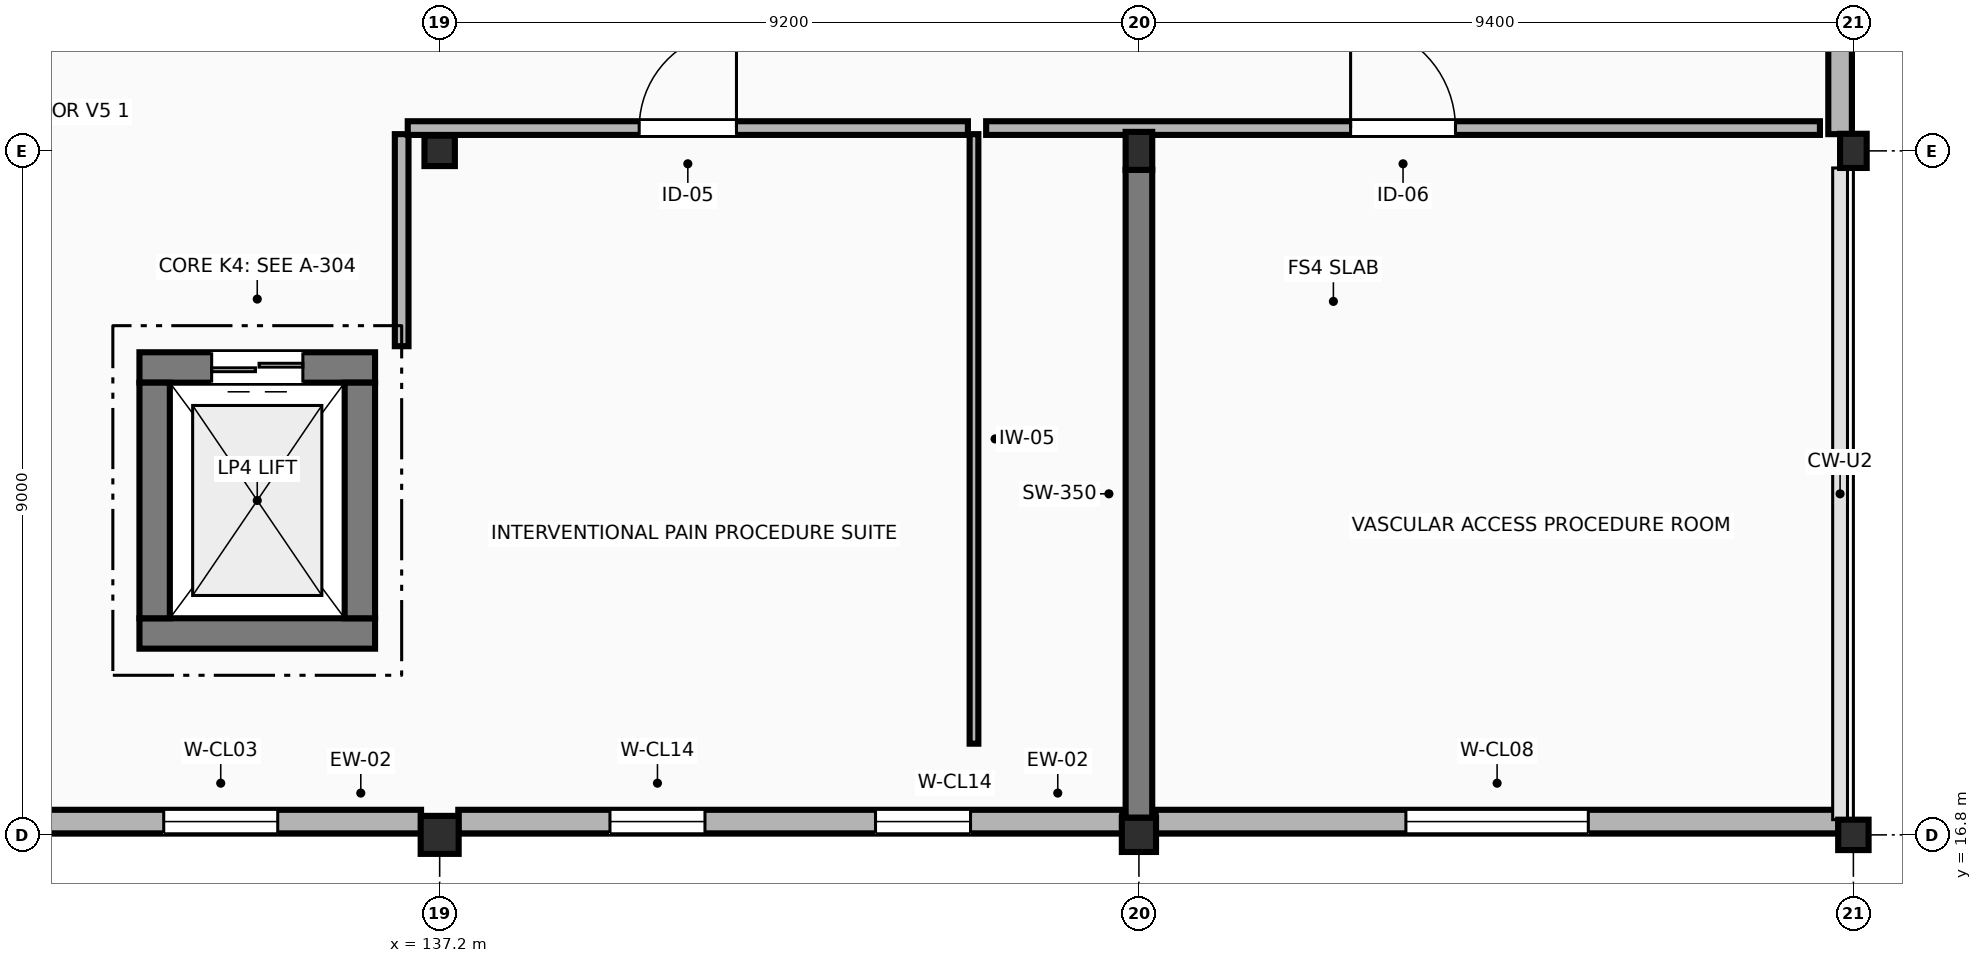
"""IFC4 building model, lengths in metres.
Left out: names, types, materials, properties, quantities, classifications, styles, units other than length and angle.
Written with IfcOpenShell. Run it as: python <this file> out.ifc"""

import sys

from ifc_helpers import new_model, si_unit, direction, frame, frame_2d, origin, origin_2d, place, context, subcontext, project, spatial, rectangle, extrude, element, fill, save


model = new_model("IFC4")
c1 = context("Model", 3, precision=1e-05, world=origin(), true_north=direction((0.0, 1.0)))
c2 = subcontext(c1, "Body", "Model", "MODEL_VIEW")
j1 = project(units=[si_unit("LENGTHUNIT", "METRE"), si_unit("PLANEANGLEUNIT", "RADIAN")], contexts=[c1])
p1 = place(None, origin())
s1 = spatial("IfcSite", under=j1, at=p1, CompositionType="ELEMENT")
p2 = place(p1, origin())
s2 = spatial("IfcBuilding", under=s1, at=p2, CompositionType="ELEMENT")
p3 = place(p2, frame((0.0, 0.0, 13.8)))
s3 = spatial("IfcBuildingStorey", under=s2, at=p3, CompositionType="ELEMENT", Elevation=13.8)
p4 = place(p3, frame((137.2, 16.8, 0.0), z_axis=(0.0, 0.0, 1.0), x_axis=(1.0, 0.0, 0.0)))
e1 = element("IfcColumn", 1, at=p4, inside=s3, PredefinedType="COLUMN", context=c2, shape_type="SweptSolid", body=[
    extrude(rectangle(XDim=0.5, YDim=0.5, at=origin_2d()), origin(), (0.0, 0.0, 1.0), 4.2),
])
p5 = place(p3, frame((137.2, 25.8, 0.0), z_axis=(0.0, 0.0, 1.0), x_axis=(1.0, 0.0, 0.0)))
e2 = element("IfcColumn", 2, at=p5, inside=s3, PredefinedType="COLUMN", context=c2, shape_type="SweptSolid", body=[
    extrude(rectangle(XDim=0.4, YDim=0.4, at=origin_2d()), origin(), (0.0, 0.0, 1.0), 4.2),
])
p6 = place(p3, frame((146.4, 16.8, 0.0), z_axis=(0.0, 0.0, 1.0), x_axis=(1.0, 0.0, 0.0)))
e3 = element("IfcColumn", 3, at=p6, inside=s3, PredefinedType="COLUMN", context=c2, shape_type="SweptSolid", body=[
    extrude(rectangle(XDim=0.45, YDim=0.45, at=origin_2d()), origin(), (0.0, 0.0, 1.0), 4.2),
])
p7 = place(p3, frame((146.4, 25.8, 0.0), z_axis=(0.0, 0.0, 1.0), x_axis=(1.0, 0.0, 0.0)))
e4 = element("IfcColumn", 4, at=p7, inside=s3, PredefinedType="COLUMN", context=c2, shape_type="SweptSolid", body=[
    extrude(rectangle(XDim=0.35, YDim=0.5, at=origin_2d()), origin(), (0.0, 0.0, 1.0), 4.2),
])
p8 = place(p3, frame((155.8, 16.8, 0.0), z_axis=(0.0, 0.0, 1.0), x_axis=(1.0, 0.0, 0.0)))
e5 = element("IfcColumn", 5, at=p8, inside=s3, PredefinedType="COLUMN", context=c2, shape_type="SweptSolid", body=[
    extrude(rectangle(XDim=0.4, YDim=0.4, at=origin_2d()), origin(), (0.0, 0.0, 1.0), 4.2),
])
p9 = place(p3, frame((155.8, 25.8, 0.0), z_axis=(0.0, 0.0, 1.0), x_axis=(1.0, 0.0, 0.0)))
e6 = element("IfcColumn", 6, at=p9, inside=s3, PredefinedType="COLUMN", context=c2, shape_type="SweptSolid", body=[
    extrude(rectangle(XDim=0.35, YDim=0.45, at=origin_2d()), origin(), (0.0, 0.0, 1.0), 4.2),
])
p10 = place(p3, frame((128.17, 16.975, 0.0), z_axis=(0.0, 0.0, 1.0), x_axis=(1.0, 0.0, 0.0)))
e7 = element("IfcWall", 7, at=p10, inside=s3, PredefinedType="STANDARD", context=c2, shape_type="SweptSolid", body=[
    extrude(rectangle(XDim=8.785, YDim=0.31, at=frame_2d((4.393, 0.0))), origin(), (0.0, 0.0, 1.0), 3.255),
])
p11 = place(p10, frame((1.885, 0.0, 0.95)))
e8 = element("IfcOpeningElement", 8, at=p11, cuts=e7, PredefinedType="OPENING", context=c2, shape_type="SweptSolid", body=[
    extrude(rectangle(XDim=1.5, YDim=1.65, at=frame_2d((0.75, 0.825))), frame((0.0, 0.165, 0.0), z_axis=(0.0, -1.0, 0.0), x_axis=(1.0, 0.0, 0.0)), (0.0, 0.0, 1.0), 0.33),
])
p12 = place(p10, frame((5.399, 0.0, 0.95)))
e9 = element("IfcOpeningElement", 9, at=p12, cuts=e7, PredefinedType="OPENING", context=c2, shape_type="SweptSolid", body=[
    extrude(rectangle(XDim=1.5, YDim=1.65, at=frame_2d((0.75, 0.825))), frame((0.0, 0.165, 0.0), z_axis=(0.0, -1.0, 0.0), x_axis=(1.0, 0.0, 0.0)), (0.0, 0.0, 1.0), 0.33),
])
p13 = place(p3, frame((137.445, 16.975, 0.0), z_axis=(0.0, 0.0, 1.0), x_axis=(1.0, 0.0, 0.0)))
e10 = element("IfcWall", 10, at=p13, inside=s3, PredefinedType="STANDARD", context=c2, shape_type="SweptSolid", body=[
    extrude(rectangle(XDim=8.735, YDim=0.31, at=frame_2d((4.367, 0.0))), origin(), (0.0, 0.0, 1.0), 3.255),
])
p14 = place(p13, frame((1.996, 0.0, 0.95)))
e11 = element("IfcOpeningElement", 11, at=p14, cuts=e10, PredefinedType="OPENING", context=c2, shape_type="SweptSolid", body=[
    extrude(rectangle(XDim=1.25, YDim=1.55, at=frame_2d((0.625, 0.775))), frame((0.0, 0.165, 0.0), z_axis=(0.0, -1.0, 0.0), x_axis=(1.0, 0.0, 0.0)), (0.0, 0.0, 1.0), 0.33),
])
p15 = place(p13, frame((5.49, 0.0, 0.95)))
e12 = element("IfcOpeningElement", 12, at=p15, cuts=e10, PredefinedType="OPENING", context=c2, shape_type="SweptSolid", body=[
    extrude(rectangle(XDim=1.25, YDim=1.55, at=frame_2d((0.625, 0.775))), frame((0.0, 0.165, 0.0), z_axis=(0.0, -1.0, 0.0), x_axis=(1.0, 0.0, 0.0)), (0.0, 0.0, 1.0), 0.33),
])
p16 = place(p3, frame((146.62, 16.975, 0.0), z_axis=(0.0, 0.0, 1.0), x_axis=(1.0, 0.0, 0.0)))
e13 = element("IfcWall", 13, at=p16, inside=s3, PredefinedType="STANDARD", context=c2, shape_type="SweptSolid", body=[
    extrude(rectangle(XDim=8.985, YDim=0.31, at=frame_2d((4.492, 0.0))), origin(), (0.0, 0.0, 1.0), 3.225),
])
p17 = place(p16, frame((3.292, 0.0, 0.95)))
e14 = element("IfcOpeningElement", 14, at=p17, cuts=e13, PredefinedType="OPENING", context=c2, shape_type="SweptSolid", body=[
    extrude(rectangle(XDim=2.4, YDim=1.5, at=frame_2d((1.2, 0.75))), frame((0.0, 0.165, 0.0), z_axis=(0.0, -1.0, 0.0), x_axis=(1.0, 0.0, 0.0)), (0.0, 0.0, 1.0), 0.33),
])
p18 = place(p3, frame((155.625, 26.02, 0.0), z_axis=(0.0, 0.0, 1.0), x_axis=(0.0, 1.0, 0.0)))
e15 = element("IfcWall", 15, at=p18, inside=s3, PredefinedType="STANDARD", context=c2, shape_type="SweptSolid", body=[
    extrude(rectangle(XDim=8.36, YDim=0.31, at=frame_2d((4.18, 0.0))), origin(), (0.0, 0.0, 1.0), 3.335),
])
p19 = place(p3, frame((133.25, 19.45, 0.0), z_axis=(0.0, 0.0, 1.0), x_axis=(1.0, 0.0, 0.0)))
e16 = element("IfcWall", 16, at=p19, inside=s3, PredefinedType="SHEAR", context=c2, shape_type="SweptSolid", body=[
    extrude(rectangle(XDim=3.1, YDim=0.4, at=frame_2d((1.55, 0.0))), origin(), (0.0, 0.0, 1.0), 4.2),
])
p20 = place(p3, frame((136.35, 22.95, 0.0), z_axis=(0.0, 0.0, 1.0), x_axis=(-1.0, 0.0, 0.0)))
e17 = element("IfcWall", 17, at=p20, inside=s3, PredefinedType="SHEAR", context=c2, shape_type="SweptSolid", body=[
    extrude(rectangle(XDim=3.1, YDim=0.4, at=frame_2d((1.55, 0.0))), origin(), (0.0, 0.0, 1.0), 4.2),
])
p21 = place(p20, frame((0.95, 0.0, 0.0)))
e18 = element("IfcOpeningElement", 18, at=p21, cuts=e17, PredefinedType="OPENING", context=c2, shape_type="SweptSolid", body=[
    extrude(rectangle(XDim=1.2, YDim=2.2, at=frame_2d((0.6, 1.1))), frame((0.0, 0.21, 0.0), z_axis=(0.0, -1.0, 0.0), x_axis=(1.0, 0.0, 0.0)), (0.0, 0.0, 1.0), 0.42),
])
for number, where, z_axis, x_axis in (
    (19, (133.45, 19.65, 0.0), (0.0, 0.0, 1.0), (0.0, 1.0, 0.0)),
    (20, (136.15, 22.75, 0.0), (0.0, 0.0, 1.0), (0.0, -1.0, 0.0)),
):
    element("IfcWall", number, at=place(p3, frame(where, z_axis=z_axis, x_axis=x_axis)), inside=s3, PredefinedType="SHEAR", context=c2, shape_type="SweptSolid", body=[
        extrude(rectangle(XDim=3.1, YDim=0.4, at=frame_2d((1.55, 0.0))), origin(), (0.0, 0.0, 1.0), 4.2),
    ])
p22 = place(p3, frame((146.4, 17.025, 0.0), z_axis=(0.0, 0.0, 1.0), x_axis=(0.0, 1.0, 0.0)))
e21 = element("IfcWall", 21, at=p22, inside=s3, PredefinedType="SHEAR", context=c2, shape_type="SweptSolid", body=[
    extrude(rectangle(XDim=8.525, YDim=0.35, at=frame_2d((4.263, 0.0))), origin(), (0.0, 0.0, 1.0), 3.92),
])
p23 = place(p3, frame((136.7, 23.23, 0.0), z_axis=(0.0, 0.0, 1.0), x_axis=(0.0, 1.0, 0.0)))
e22 = element("IfcWall", 22, at=p23, inside=s3, PredefinedType="PARTITIONING", context=c2, shape_type="SweptSolid", body=[
    extrude(rectangle(XDim=2.79, YDim=0.18, at=frame_2d((1.395, 0.0))), origin(), (0.0, 0.0, 1.0), 3.305),
])
p24 = place(p3, frame((136.78, 26.1, 0.0), z_axis=(0.0, 0.0, 1.0), x_axis=(1.0, 0.0, 0.0)))
e23 = element("IfcWall", 23, at=p24, inside=s3, PredefinedType="PARTITIONING", context=c2, shape_type="SweptSolid", body=[
    extrude(rectangle(XDim=7.37, YDim=0.18, at=frame_2d((3.685, 0.0))), origin(), (0.0, 0.0, 1.0), 3.255),
])
p25 = place(p24, frame((3.045, 0.0, 0.0)))
e24 = element("IfcOpeningElement", 24, at=p25, cuts=e23, PredefinedType="OPENING", context=c2, shape_type="SweptSolid", body=[
    extrude(rectangle(XDim=1.28, YDim=2.25, at=frame_2d((0.64, 1.125))), frame((0.0, 0.1, 0.0), z_axis=(0.0, -1.0, 0.0), x_axis=(1.0, 0.0, 0.0)), (0.0, 0.0, 1.0), 0.2),
])
p26 = place(p3, frame((144.23, 26.02, 0.0), z_axis=(0.0, 0.0, 1.0), x_axis=(0.0, -1.0, 0.0)))
e25 = element("IfcWall", 25, at=p26, inside=s3, PredefinedType="PARTITIONING", context=c2, shape_type="SweptSolid", body=[
    extrude(rectangle(XDim=8.02, YDim=0.115, at=frame_2d((4.01, 0.0))), origin(), (0.0, 0.0, 1.0), 3.92),
])
p27 = place(p3, frame((144.39, 26.1, 0.0), z_axis=(0.0, 0.0, 1.0), x_axis=(1.0, 0.0, 0.0)))
e26 = element("IfcWall", 26, at=p27, inside=s3, PredefinedType="PARTITIONING", context=c2, shape_type="SweptSolid", body=[
    extrude(rectangle(XDim=10.97, YDim=0.18, at=frame_2d((5.485, 0.0))), origin(), (0.0, 0.0, 1.0), 3.195),
])
p28 = place(p27, frame((4.795, 0.0, 0.0)))
e27 = element("IfcOpeningElement", 27, at=p28, cuts=e26, PredefinedType="OPENING", context=c2, shape_type="SweptSolid", body=[
    extrude(rectangle(XDim=1.38, YDim=2.25, at=frame_2d((0.69, 1.125))), frame((0.0, 0.1, 0.0), z_axis=(0.0, -1.0, 0.0), x_axis=(1.0, 0.0, 0.0)), (0.0, 0.0, 1.0), 0.2),
])
p29 = place(p12, origin())
e28 = element("IfcWindow", 28, at=p29, inside=s3, PartitioningType="SINGLE_PANEL", PredefinedType="WINDOW", context=c2, shape_type="SweptSolid", body=[
    extrude(rectangle(XDim=1.5, YDim=1.65, at=frame_2d((0.75, 0.825))), frame((0.0, 0.03, 0.0), z_axis=(0.0, -1.0, 0.0), x_axis=(1.0, 0.0, 0.0)), (0.0, 0.0, 1.0), 0.06),
])
fill(e9, e28)
p30 = place(p14, origin())
e29 = element("IfcWindow", 29, at=p30, inside=s3, PartitioningType="SINGLE_PANEL", PredefinedType="WINDOW", context=c2, shape_type="SweptSolid", body=[
    extrude(rectangle(XDim=1.25, YDim=1.55, at=frame_2d((0.625, 0.775))), frame((0.0, 0.03, 0.0), z_axis=(0.0, -1.0, 0.0), x_axis=(1.0, 0.0, 0.0)), (0.0, 0.0, 1.0), 0.06),
])
fill(e11, e29)
p31 = place(p15, origin())
e30 = element("IfcWindow", 30, at=p31, inside=s3, PartitioningType="SINGLE_PANEL", PredefinedType="WINDOW", context=c2, shape_type="SweptSolid", body=[
    extrude(rectangle(XDim=1.25, YDim=1.55, at=frame_2d((0.625, 0.775))), frame((0.0, 0.03, 0.0), z_axis=(0.0, -1.0, 0.0), x_axis=(1.0, 0.0, 0.0)), (0.0, 0.0, 1.0), 0.06),
])
fill(e12, e30)
p32 = place(p17, origin())
e31 = element("IfcWindow", 31, at=p32, inside=s3, PartitioningType="SINGLE_PANEL", PredefinedType="WINDOW", context=c2, shape_type="SweptSolid", body=[
    extrude(rectangle(XDim=2.4, YDim=1.5, at=frame_2d((1.2, 0.75))), frame((0.0, 0.03, 0.0), z_axis=(0.0, -1.0, 0.0), x_axis=(1.0, 0.0, 0.0)), (0.0, 0.0, 1.0), 0.06),
])
fill(e14, e31)
p33 = place(p21, origin())
e32 = element("IfcDoor", 32, at=p33, inside=s3, OperationType="DOUBLE_DOOR_SLIDING", PredefinedType="DOOR", context=c2, shape_type="SweptSolid", body=[
    extrude(rectangle(XDim=1.2, YDim=2.2, at=frame_2d((0.6, 1.1))), frame((0.0, 0.025, 0.0), z_axis=(0.0, -1.0, 0.0), x_axis=(1.0, 0.0, 0.0)), (0.0, 0.0, 1.0), 0.05),
])
fill(e18, e32)
p34 = place(p25, origin())
e33 = element("IfcDoor", 33, at=p34, inside=s3, OperationType="SINGLE_SWING_RIGHT", PredefinedType="DOOR", context=c2, shape_type="SweptSolid", body=[
    extrude(rectangle(XDim=1.28, YDim=2.25, at=frame_2d((0.64, 1.125))), frame((0.0, 0.025, 0.0), z_axis=(0.0, -1.0, 0.0), x_axis=(1.0, 0.0, 0.0)), (0.0, 0.0, 1.0), 0.05),
])
fill(e24, e33)
p35 = place(p28, origin())
e34 = element("IfcDoor", 34, at=p35, inside=s3, OperationType="SINGLE_SWING_LEFT", PredefinedType="DOOR", context=c2, shape_type="SweptSolid", body=[
    extrude(rectangle(XDim=1.38, YDim=2.25, at=frame_2d((0.69, 1.125))), frame((0.0, 0.025, 0.0), z_axis=(0.0, -1.0, 0.0), x_axis=(1.0, 0.0, 0.0)), (0.0, 0.0, 1.0), 0.05),
])
fill(e27, e34)
save(model, sys.argv[1])
